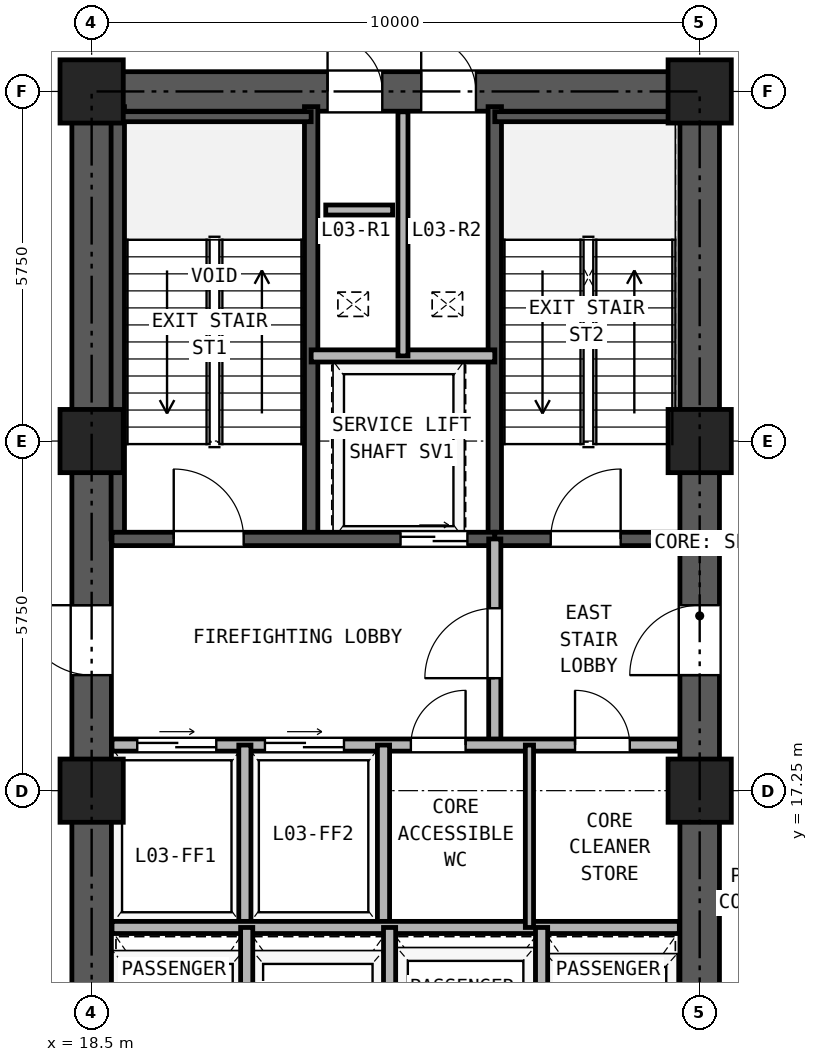
"""IFC4 building model, lengths in metres.
Left out: names, types, materials, properties, quantities, classifications, styles, units other than length and angle.
Written with IfcOpenShell. Run it as: python <this file> out.ifc"""

import sys

from ifc_helpers import new_model, si_unit, direction, frame, frame_2d, origin, origin_2d, place, context, subcontext, project, spatial, rectangle, hollow_rectangle, extrude, source, transform, mapped, element, fill, save


model = new_model("IFC4")
c1 = context("Model", 3, precision=1e-05, world=origin(), true_north=direction((0.0, 1.0)))
c2 = subcontext(c1, "Body", "Model", "MODEL_VIEW")
j1 = project(units=[si_unit("LENGTHUNIT", "METRE"), si_unit("PLANEANGLEUNIT", "RADIAN")], contexts=[c1])
p1 = place(None, origin())
s1 = spatial("IfcSite", under=j1, at=p1, CompositionType="ELEMENT")
p2 = place(p1, origin())
s2 = spatial("IfcBuilding", under=s1, at=p2, CompositionType="ELEMENT")
p3 = place(p2, frame((0.0, 0.0, 13.5)))
s3 = spatial("IfcBuildingStorey", under=s2, at=p3, CompositionType="ELEMENT", Elevation=13.5)
m1 = source(origin(), c2, "Body", "SweptSolid", [
    extrude(hollow_rectangle(XDim=1.04, YDim=1.04, WallThickness=0.065, at=origin_2d()), origin(), (0.0, 0.0, 1.0), 4.18),
])
for number, where, z_axis, x_axis in (
    (1, (18.5, 17.25, 0.0), (0.0, 0.0, 1.0), (1.0, 0.0, 0.0)),
    (2, (18.5, 23.0, 0.0), (0.0, 0.0, 1.0), (1.0, 0.0, 0.0)),
    (3, (18.5, 28.75, 0.0), (0.0, 0.0, 1.0), (1.0, 0.0, 0.0)),
    (4, (28.5, 17.25, 0.0), (0.0, 0.0, 1.0), (1.0, 0.0, 0.0)),
    (5, (28.5, 23.0, 0.0), (0.0, 0.0, 1.0), (1.0, 0.0, 0.0)),
    (6, (28.5, 28.75, 0.0), (0.0, 0.0, 1.0), (1.0, 0.0, 0.0)),
):
    element("IfcColumn", number, at=place(p3, frame(where, z_axis=z_axis, x_axis=x_axis)), inside=s3, PredefinedType="COLUMN", context=c2, shape_type="MappedRepresentation", body=[
        mapped(m1, transform((0.0, 0.0, 0.0), x_axis=(1.0, 0.0, 0.0), y_axis=(0.0, 1.0, 0.0), z_axis=(0.0, 0.0, 1.0), scale=1.0)),
    ])
p4 = place(p3, frame((18.175, 28.75, 0.0), z_axis=(0.0, 0.0, 1.0), x_axis=(1.0, 0.0, 0.0)))
e7 = element("IfcWall", 7, at=p4, inside=s3, PredefinedType="SHEAR", context=c2, shape_type="SweptSolid", body=[
    extrude(rectangle(XDim=10.65, YDim=0.65, at=frame_2d((5.325, 0.0))), origin(), (0.0, 0.0, 1.0), 4.18),
])
p5 = place(p4, frame((4.205, 0.0, 0.0)))
e8 = element("IfcOpeningElement", 8, at=p5, cuts=e7, PredefinedType="OPENING", context=c2, shape_type="SweptSolid", body=[
    extrude(rectangle(XDim=0.9, YDim=2.05, at=frame_2d((0.45, 1.025))), frame((0.0, 0.335, 0.0), z_axis=(0.0, -1.0, 0.0), x_axis=(1.0, 0.0, 0.0)), (0.0, 0.0, 1.0), 0.67),
])
p6 = place(p4, frame((5.745, 0.0, 0.0)))
e9 = element("IfcOpeningElement", 9, at=p6, cuts=e7, PredefinedType="OPENING", context=c2, shape_type="SweptSolid", body=[
    extrude(rectangle(XDim=0.9, YDim=2.05, at=frame_2d((0.45, 1.025))), frame((0.0, 0.335, 0.0), z_axis=(0.0, -1.0, 0.0), x_axis=(1.0, 0.0, 0.0)), (0.0, 0.0, 1.0), 0.67),
])
p7 = place(p3, frame((18.5, 11.825, 0.0), z_axis=(0.0, 0.0, 1.0), x_axis=(0.0, 1.0, 0.0)))
e10 = element("IfcWall", 10, at=p7, inside=s3, PredefinedType="SHEAR", context=c2, shape_type="SweptSolid", body=[
    extrude(rectangle(XDim=16.6, YDim=0.65, at=frame_2d((8.3, 0.0))), origin(), (0.0, 0.0, 1.0), 4.18),
])
p8 = place(p7, frame((7.325, 0.0, 0.0)))
e11 = element("IfcOpeningElement", 11, at=p8, cuts=e10, PredefinedType="OPENING", context=c2, shape_type="SweptSolid", body=[
    extrude(rectangle(XDim=1.15, YDim=2.2, at=frame_2d((0.575, 1.1))), frame((0.0, 0.335, 0.0), z_axis=(0.0, -1.0, 0.0), x_axis=(1.0, 0.0, 0.0)), (0.0, 0.0, 1.0), 0.67),
])
p9 = place(p3, frame((28.5, 11.825, 0.0), z_axis=(0.0, 0.0, 1.0), x_axis=(0.0, 1.0, 0.0)))
e12 = element("IfcWall", 12, at=p9, inside=s3, PredefinedType="SHEAR", context=c2, shape_type="SweptSolid", body=[
    extrude(rectangle(XDim=16.6, YDim=0.65, at=frame_2d((8.3, 0.0))), origin(), (0.0, 0.0, 1.0), 4.18),
])
p10 = place(p9, frame((7.325, 0.0, 0.0)))
e13 = element("IfcOpeningElement", 13, at=p10, cuts=e12, PredefinedType="OPENING", context=c2, shape_type="SweptSolid", body=[
    extrude(rectangle(XDim=1.15, YDim=2.2, at=frame_2d((0.575, 1.1))), frame((0.0, 0.335, 0.0), z_axis=(0.0, -1.0, 0.0), x_axis=(1.0, 0.0, 0.0)), (0.0, 0.0, 1.0), 0.67),
])
for number, where, z_axis, x_axis in (
    (14, (18.93, 21.39, 0.0), (0.0, 0.0, 1.0), (0.0, 1.0, 0.0)),
    (15, (22.11, 21.39, 0.0), (0.0, 0.0, 1.0), (0.0, 1.0, 0.0)),
    (16, (25.13, 21.39, 0.0), (0.0, 0.0, 1.0), (0.0, 1.0, 0.0)),
):
    element("IfcWall", number, at=place(p3, frame(where, z_axis=z_axis, x_axis=x_axis)), inside=s3, PredefinedType="SOLIDWALL", context=c2, shape_type="SweptSolid", body=[
        extrude(rectangle(XDim=7.11, YDim=0.22, at=frame_2d((3.555, 0.0))), origin(), (0.0, 0.0, 1.0), 4.18),
    ])
p11 = place(p3, frame((18.835, 28.335, 0.0), z_axis=(0.0, 0.0, 1.0), x_axis=(1.0, 0.0, 0.0)))
e17 = element("IfcWall", 17, at=p11, inside=s3, PredefinedType="PARTITIONING", context=c2, shape_type="SweptSolid", body=[
    extrude(rectangle(XDim=3.275, YDim=0.165, at=frame_2d((1.638, 0.0))), origin(), (0.0, 0.0, 1.0), 4.18),
])
p12 = place(p3, frame((25.13, 28.335, 0.0), z_axis=(0.0, 0.0, 1.0), x_axis=(1.0, 0.0, 0.0)))
e18 = element("IfcWall", 18, at=p12, inside=s3, PredefinedType="PARTITIONING", context=c2, shape_type="SweptSolid", body=[
    extrude(rectangle(XDim=3.035, YDim=0.165, at=frame_2d((1.518, 0.0))), origin(), (0.0, 0.0, 1.0), 4.18),
])
p13 = place(p3, frame((18.835, 21.39, 0.0), z_axis=(0.0, 0.0, 1.0), x_axis=(1.0, 0.0, 0.0)))
e19 = element("IfcWall", 19, at=p13, inside=s3, PredefinedType="SOLIDWALL", context=c2, shape_type="SweptSolid", body=[
    extrude(rectangle(XDim=6.295, YDim=0.22, at=frame_2d((3.147, 0.0))), origin(), (0.0, 0.0, 1.0), 4.18),
])
p14 = place(p13, frame((1.015, 0.0, 0.0)))
e20 = element("IfcOpeningElement", 20, at=p14, cuts=e19, PredefinedType="OPENING", context=c2, shape_type="SweptSolid", body=[
    extrude(rectangle(XDim=1.15, YDim=2.2, at=frame_2d((0.575, 1.1))), frame((0.0, 0.12, 0.0), z_axis=(0.0, -1.0, 0.0), x_axis=(1.0, 0.0, 0.0)), (0.0, 0.0, 1.0), 0.24),
])
p15 = place(p13, frame((4.745, 0.0, 0.0)))
e21 = element("IfcOpeningElement", 21, at=p15, cuts=e19, PredefinedType="OPENING", context=c2, shape_type="SweptSolid", body=[
    extrude(rectangle(XDim=1.1, YDim=2.25, at=frame_2d((0.55, 1.125))), frame((0.0, 0.12, 0.0), z_axis=(0.0, -1.0, 0.0), x_axis=(1.0, 0.0, 0.0)), (0.0, 0.0, 1.0), 0.24),
])
p16 = place(p3, frame((25.13, 21.39, 0.0), z_axis=(0.0, 0.0, 1.0), x_axis=(1.0, 0.0, 0.0)))
e22 = element("IfcWall", 22, at=p16, inside=s3, PredefinedType="SOLIDWALL", context=c2, shape_type="SweptSolid", body=[
    extrude(rectangle(XDim=3.035, YDim=0.22, at=frame_2d((1.518, 0.0))), origin(), (0.0, 0.0, 1.0), 4.18),
])
p17 = place(p16, frame((0.92, 0.0, 0.0)))
e23 = element("IfcOpeningElement", 23, at=p17, cuts=e22, PredefinedType="OPENING", context=c2, shape_type="SweptSolid", body=[
    extrude(rectangle(XDim=1.15, YDim=2.2, at=frame_2d((0.575, 1.1))), frame((0.0, 0.12, 0.0), z_axis=(0.0, -1.0, 0.0), x_axis=(1.0, 0.0, 0.0)), (0.0, 0.0, 1.0), 0.24),
])
p18 = place(p3, frame((22.11, 24.4, 0.0), z_axis=(0.0, 0.0, 1.0), x_axis=(1.0, 0.0, 0.0)))
e24 = element("IfcWall", 24, at=p18, inside=s3, PredefinedType="PARTITIONING", context=c2, shape_type="SweptSolid", body=[
    extrude(rectangle(XDim=3.02, YDim=0.2, at=frame_2d((1.51, 0.0))), origin(), (0.0, 0.0, 1.0), 4.18),
])
p19 = place(p3, frame((23.62, 24.4, 0.0), z_axis=(0.0, 0.0, 1.0), x_axis=(0.0, 1.0, 0.0)))
e25 = element("IfcWall", 25, at=p19, inside=s3, PredefinedType="PARTITIONING", context=c2, shape_type="SweptSolid", body=[
    extrude(rectangle(XDim=4.015, YDim=0.165, at=frame_2d((2.008, 0.0))), origin(), (0.0, 0.0, 1.0), 4.18),
])
p20 = place(p3, frame((25.13, 18.0, 0.0), z_axis=(0.0, 0.0, 1.0), x_axis=(0.0, 1.0, 0.0)))
e26 = element("IfcWall", 26, at=p20, inside=s3, PredefinedType="PARTITIONING", context=c2, shape_type="SweptSolid", body=[
    extrude(rectangle(XDim=3.39, YDim=0.2, at=frame_2d((1.695, 0.0))), origin(), (0.0, 0.0, 1.0), 4.18),
])
p21 = place(p20, frame((1.1, 0.0, 0.0)))
e27 = element("IfcOpeningElement", 27, at=p21, cuts=e26, PredefinedType="OPENING", context=c2, shape_type="SweptSolid", body=[
    extrude(rectangle(XDim=1.15, YDim=2.2, at=frame_2d((0.575, 1.1))), frame((0.0, 0.11, 0.0), z_axis=(0.0, -1.0, 0.0), x_axis=(1.0, 0.0, 0.0)), (0.0, 0.0, 1.0), 0.22),
])
p22 = place(p3, frame((18.835, 18.0, 0.0), z_axis=(0.0, 0.0, 1.0), x_axis=(1.0, 0.0, 0.0)))
e28 = element("IfcWall", 28, at=p22, inside=s3, PredefinedType="PARTITIONING", context=c2, shape_type="SweptSolid", body=[
    extrude(rectangle(XDim=9.33, YDim=0.2, at=frame_2d((4.665, 0.0))), origin(), (0.0, 0.0, 1.0), 4.18),
])
p23 = place(p22, frame((0.415, 0.0, 0.0)))
e29 = element("IfcOpeningElement", 29, at=p23, cuts=e28, PredefinedType="OPENING", context=c2, shape_type="SweptSolid", body=[
    extrude(rectangle(XDim=1.3, YDim=2.3, at=frame_2d((0.65, 1.15))), frame((0.0, 0.11, 0.0), z_axis=(0.0, -1.0, 0.0), x_axis=(1.0, 0.0, 0.0)), (0.0, 0.0, 1.0), 0.22),
])
p24 = place(p22, frame((2.515, 0.0, 0.0)))
e30 = element("IfcOpeningElement", 30, at=p24, cuts=e28, PredefinedType="OPENING", context=c2, shape_type="SweptSolid", body=[
    extrude(rectangle(XDim=1.3, YDim=2.3, at=frame_2d((0.65, 1.15))), frame((0.0, 0.11, 0.0), z_axis=(0.0, -1.0, 0.0), x_axis=(1.0, 0.0, 0.0)), (0.0, 0.0, 1.0), 0.22),
])
p25 = place(p22, frame((4.915, 0.0, 0.0)))
e31 = element("IfcOpeningElement", 31, at=p25, cuts=e28, PredefinedType="OPENING", context=c2, shape_type="SweptSolid", body=[
    extrude(rectangle(XDim=0.9, YDim=2.05, at=frame_2d((0.45, 1.025))), frame((0.0, 0.11, 0.0), z_axis=(0.0, -1.0, 0.0), x_axis=(1.0, 0.0, 0.0)), (0.0, 0.0, 1.0), 0.22),
])
p26 = place(p22, frame((7.615, 0.0, 0.0)))
e32 = element("IfcOpeningElement", 32, at=p26, cuts=e28, PredefinedType="OPENING", context=c2, shape_type="SweptSolid", body=[
    extrude(rectangle(XDim=0.9, YDim=2.05, at=frame_2d((0.45, 1.025))), frame((0.0, 0.11, 0.0), z_axis=(0.0, -1.0, 0.0), x_axis=(1.0, 0.0, 0.0)), (0.0, 0.0, 1.0), 0.22),
])
for number, where, z_axis, x_axis in (
    (33, (21.02, 15.0, 0.0), (0.0, 0.0, 1.0), (0.0, 1.0, 0.0)),
    (34, (23.3, 15.0, 0.0), (0.0, 0.0, 1.0), (0.0, 1.0, 0.0)),
):
    element("IfcWall", number, at=place(p3, frame(where, z_axis=z_axis, x_axis=x_axis)), inside=s3, PredefinedType="PARTITIONING", context=c2, shape_type="SweptSolid", body=[
        extrude(rectangle(XDim=3.0, YDim=0.2, at=frame_2d((1.5, 0.0))), origin(), (0.0, 0.0, 1.0), 4.18),
    ])
p27 = place(p3, frame((18.835, 15.0, 0.0), z_axis=(0.0, 0.0, 1.0), x_axis=(1.0, 0.0, 0.0)))
e35 = element("IfcWall", 35, at=p27, inside=s3, PredefinedType="PARTITIONING", context=c2, shape_type="SweptSolid", body=[
    extrude(rectangle(XDim=9.33, YDim=0.2, at=frame_2d((4.665, 0.0))), origin(), (0.0, 0.0, 1.0), 4.18),
])
p28 = place(p3, frame((25.7, 15.0, 0.0), z_axis=(0.0, 0.0, 1.0), x_axis=(0.0, 1.0, 0.0)))
e36 = element("IfcWall", 36, at=p28, inside=s3, PredefinedType="PARTITIONING", context=c2, shape_type="SweptSolid", body=[
    extrude(rectangle(XDim=3.0, YDim=0.135, at=frame_2d((1.5, 0.0))), origin(), (0.0, 0.0, 1.0), 4.18),
])
for number, where, z_axis, x_axis in (
    (37, (21.05, 11.835, 0.0), (0.0, 0.0, 1.0), (0.0, 1.0, 0.0)),
    (38, (23.4, 11.835, 0.0), (0.0, 0.0, 1.0), (0.0, 1.0, 0.0)),
    (39, (25.9, 11.835, 0.0), (0.0, 0.0, 1.0), (0.0, 1.0, 0.0)),
):
    element("IfcWall", number, at=place(p3, frame(where, z_axis=z_axis, x_axis=x_axis)), inside=s3, PredefinedType="PARTITIONING", context=c2, shape_type="SweptSolid", body=[
        extrude(rectangle(XDim=3.165, YDim=0.2, at=frame_2d((1.583, 0.0))), origin(), (0.0, 0.0, 1.0), 4.18),
    ])
p29 = place(p3, frame((22.35, 26.8, 0.0), z_axis=(0.0, 0.0, 1.0), x_axis=(1.0, 0.0, 0.0)))
e40 = element("IfcWall", 40, at=p29, inside=s3, PredefinedType="PARTITIONING", context=c2, shape_type="SweptSolid", body=[
    extrude(rectangle(XDim=1.1, YDim=0.165, at=frame_2d((0.55, 0.0))), origin(), (0.0, 0.0, 1.0), 4.18),
])
p30 = place(p14, frame((1.15, 0.0, 0.0), z_axis=(0.0, 0.0, 1.0), x_axis=(-1.0, 0.0, 0.0)))
e41 = element("IfcDoor", 41, at=p30, inside=s3, OperationType="SINGLE_SWING_LEFT", PredefinedType="DOOR", context=c2, shape_type="SweptSolid", body=[
    extrude(rectangle(XDim=1.15, YDim=2.2, at=frame_2d((0.575, 1.1))), frame((0.0, 0.025, 0.0), z_axis=(0.0, -1.0, 0.0), x_axis=(1.0, 0.0, 0.0)), (0.0, 0.0, 1.0), 0.05),
])
fill(e20, e41)
p31 = place(p17, frame((1.15, 0.0, 0.0), z_axis=(0.0, 0.0, 1.0), x_axis=(-1.0, 0.0, 0.0)))
e42 = element("IfcDoor", 42, at=p31, inside=s3, OperationType="SINGLE_SWING_RIGHT", PredefinedType="DOOR", context=c2, shape_type="SweptSolid", body=[
    extrude(rectangle(XDim=1.15, YDim=2.2, at=frame_2d((0.575, 1.1))), frame((0.0, 0.025, 0.0), z_axis=(0.0, -1.0, 0.0), x_axis=(1.0, 0.0, 0.0)), (0.0, 0.0, 1.0), 0.05),
])
fill(e23, e42)
p32 = place(p15, frame((1.1, 0.0, 0.0), z_axis=(0.0, 0.0, 1.0), x_axis=(-1.0, 0.0, 0.0)))
e43 = element("IfcDoor", 43, at=p32, inside=s3, OperationType="DOUBLE_DOOR_SLIDING", PredefinedType="DOOR", context=c2, shape_type="SweptSolid", body=[
    extrude(rectangle(XDim=1.1, YDim=2.25, at=frame_2d((0.55, 1.125))), frame((0.0, 0.025, 0.0), z_axis=(0.0, -1.0, 0.0), x_axis=(1.0, 0.0, 0.0)), (0.0, 0.0, 1.0), 0.05),
])
fill(e21, e43)
p33 = place(p21, origin())
e44 = element("IfcDoor", 44, at=p33, inside=s3, OperationType="SINGLE_SWING_LEFT", PredefinedType="DOOR", context=c2, shape_type="SweptSolid", body=[
    extrude(rectangle(XDim=1.15, YDim=2.2, at=frame_2d((0.575, 1.1))), frame((0.0, 0.025, 0.0), z_axis=(0.0, -1.0, 0.0), x_axis=(1.0, 0.0, 0.0)), (0.0, 0.0, 1.0), 0.05),
])
fill(e27, e44)
p34 = place(p23, origin())
e45 = element("IfcDoor", 45, at=p34, inside=s3, OperationType="DOUBLE_DOOR_SLIDING", PredefinedType="DOOR", context=c2, shape_type="SweptSolid", body=[
    extrude(rectangle(XDim=1.3, YDim=2.3, at=frame_2d((0.65, 1.15))), frame((0.0, 0.025, 0.0), z_axis=(0.0, -1.0, 0.0), x_axis=(1.0, 0.0, 0.0)), (0.0, 0.0, 1.0), 0.05),
])
fill(e29, e45)
p35 = place(p24, origin())
e46 = element("IfcDoor", 46, at=p35, inside=s3, OperationType="DOUBLE_DOOR_SLIDING", PredefinedType="DOOR", context=c2, shape_type="SweptSolid", body=[
    extrude(rectangle(XDim=1.3, YDim=2.3, at=frame_2d((0.65, 1.15))), frame((0.0, 0.025, 0.0), z_axis=(0.0, -1.0, 0.0), x_axis=(1.0, 0.0, 0.0)), (0.0, 0.0, 1.0), 0.05),
])
fill(e30, e46)
p36 = place(p25, frame((0.9, 0.0, 0.0), z_axis=(0.0, 0.0, 1.0), x_axis=(-1.0, 0.0, 0.0)))
e47 = element("IfcDoor", 47, at=p36, inside=s3, OperationType="SINGLE_SWING_RIGHT", PredefinedType="DOOR", context=c2, shape_type="SweptSolid", body=[
    extrude(rectangle(XDim=0.9, YDim=2.05, at=frame_2d((0.45, 1.025))), frame((0.0, 0.025, 0.0), z_axis=(0.0, -1.0, 0.0), x_axis=(1.0, 0.0, 0.0)), (0.0, 0.0, 1.0), 0.05),
])
fill(e31, e47)
p37 = place(p26, frame((0.9, 0.0, 0.0), z_axis=(0.0, 0.0, 1.0), x_axis=(-1.0, 0.0, 0.0)))
e48 = element("IfcDoor", 48, at=p37, inside=s3, OperationType="SINGLE_SWING_LEFT", PredefinedType="DOOR", context=c2, shape_type="SweptSolid", body=[
    extrude(rectangle(XDim=0.9, YDim=2.05, at=frame_2d((0.45, 1.025))), frame((0.0, 0.025, 0.0), z_axis=(0.0, -1.0, 0.0), x_axis=(1.0, 0.0, 0.0)), (0.0, 0.0, 1.0), 0.05),
])
fill(e32, e48)
p38 = place(p8, frame((1.15, 0.0, 0.0), z_axis=(0.0, 0.0, 1.0), x_axis=(-1.0, 0.0, 0.0)))
e49 = element("IfcDoor", 49, at=p38, inside=s3, OperationType="SINGLE_SWING_RIGHT", PredefinedType="DOOR", context=c2, shape_type="SweptSolid", body=[
    extrude(rectangle(XDim=1.15, YDim=2.2, at=frame_2d((0.575, 1.1))), frame((0.0, 0.025, 0.0), z_axis=(0.0, -1.0, 0.0), x_axis=(1.0, 0.0, 0.0)), (0.0, 0.0, 1.0), 0.05),
])
fill(e11, e49)
p39 = place(p10, origin())
e50 = element("IfcDoor", 50, at=p39, inside=s3, OperationType="SINGLE_SWING_LEFT", PredefinedType="DOOR", context=c2, shape_type="SweptSolid", body=[
    extrude(rectangle(XDim=1.15, YDim=2.2, at=frame_2d((0.575, 1.1))), frame((0.0, 0.025, 0.0), z_axis=(0.0, -1.0, 0.0), x_axis=(1.0, 0.0, 0.0)), (0.0, 0.0, 1.0), 0.05),
])
fill(e13, e50)
p40 = place(p5, origin())
e51 = element("IfcDoor", 51, at=p40, inside=s3, OperationType="SINGLE_SWING_LEFT", PredefinedType="DOOR", context=c2, shape_type="SweptSolid", body=[
    extrude(rectangle(XDim=0.9, YDim=2.05, at=frame_2d((0.45, 1.025))), frame((0.0, 0.025, 0.0), z_axis=(0.0, -1.0, 0.0), x_axis=(1.0, 0.0, 0.0)), (0.0, 0.0, 1.0), 0.05),
])
fill(e8, e51)
p41 = place(p6, origin())
e52 = element("IfcDoor", 52, at=p41, inside=s3, OperationType="SINGLE_SWING_LEFT", PredefinedType="DOOR", context=c2, shape_type="SweptSolid", body=[
    extrude(rectangle(XDim=0.9, YDim=2.05, at=frame_2d((0.45, 1.025))), frame((0.0, 0.025, 0.0), z_axis=(0.0, -1.0, 0.0), x_axis=(1.0, 0.0, 0.0)), (0.0, 0.0, 1.0), 0.05),
])
fill(e9, e52)
save(model, sys.argv[1])
